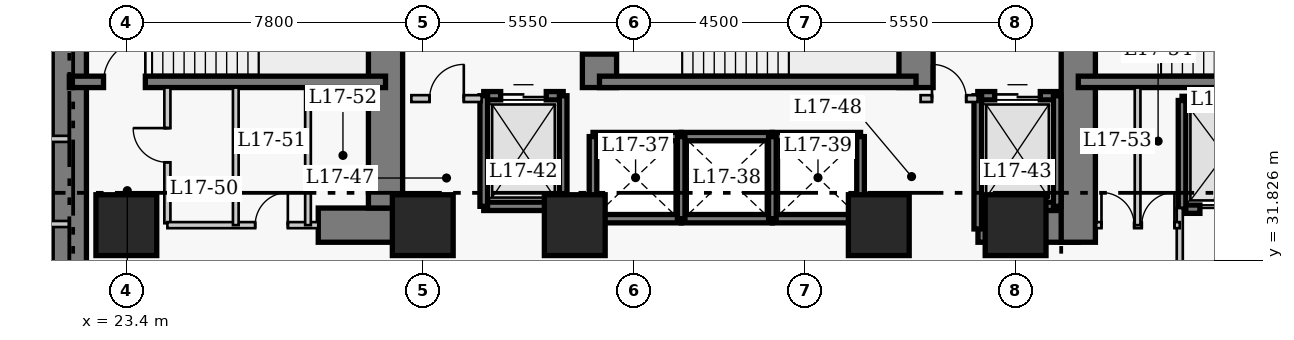
"""IFC4 building model, lengths in metres.
Left out: names, types, materials, properties, quantities, classifications, styles, units other than length and angle.
Written with IfcOpenShell. Run it as: python <this file> out.ifc"""

import sys

from ifc_helpers import new_model, si_unit, direction, frame, frame_2d, origin, origin_2d, place, context, subcontext, project, spatial, rectangle, extrude, element, fill, save


model = new_model("IFC4")
c1 = context("Model", 3, precision=1e-05, world=origin(), true_north=direction((0.0, 1.0)))
c2 = subcontext(c1, "Body", "Model", "MODEL_VIEW")
j1 = project(units=[si_unit("LENGTHUNIT", "METRE"), si_unit("PLANEANGLEUNIT", "RADIAN")], contexts=[c1])
p1 = place(None, origin())
s1 = spatial("IfcSite", under=j1, at=p1, CompositionType="ELEMENT")
p2 = place(p1, origin())
s2 = spatial("IfcBuilding", under=s1, at=p2, CompositionType="ELEMENT")
p3 = place(p2, frame((0.0, 0.0, 71.6)))
s3 = spatial("IfcBuildingStorey", under=s2, at=p3, CompositionType="ELEMENT", Elevation=71.6)
p4 = place(p3, frame((21.9, 27.05, 0.0), z_axis=(0.0, 0.0, 1.0), x_axis=(0.0, 1.0, 0.0)))
e1 = element("IfcWall", 1, at=p4, inside=s3, PredefinedType="SHEAR", context=c2, shape_type="SweptSolid", body=[
    extrude(rectangle(XDim=13.72, YDim=0.9, at=frame_2d((6.86, 0.0))), origin(), (0.0, 0.0, 1.0), 3.8),
])
p5 = place(p3, frame((28.45, 32.75, 0.0), z_axis=(0.0, 0.0, 1.0), x_axis=(1.0, 0.0, 0.0)))
e2 = element("IfcWall", 2, at=p5, inside=s3, PredefinedType="SHEAR", context=c2, shape_type="SweptSolid", body=[
    extrude(rectangle(XDim=2.4, YDim=0.9, at=frame_2d((1.2, 0.0))), origin(), (0.0, 0.0, 1.0), 3.8),
])
p6 = place(p3, frame((45.81, 32.75, 0.0), z_axis=(0.0, 0.0, 1.0), x_axis=(1.0, 0.0, 0.0)))
e3 = element("IfcWall", 3, at=p6, inside=s3, PredefinedType="SHEAR", context=c2, shape_type="SweptSolid", body=[
    extrude(rectangle(XDim=2.64, YDim=0.9, at=frame_2d((1.32, 0.0))), origin(), (0.0, 0.0, 1.0), 3.8),
])
p7 = place(p3, frame((30.22, 33.2, 0.0), z_axis=(0.0, 0.0, 1.0), x_axis=(0.0, 1.0, 0.0)))
e4 = element("IfcWall", 4, at=p7, inside=s3, PredefinedType="SHEAR", context=c2, shape_type="SweptSolid", body=[
    extrude(rectangle(XDim=7.12, YDim=0.9, at=frame_2d((3.56, 0.0))), origin(), (0.0, 0.0, 1.0), 3.8),
])
p8 = place(p3, frame((35.85, 36.37, 0.0), z_axis=(0.0, 0.0, 1.0), x_axis=(0.0, 1.0, 0.0)))
e5 = element("IfcWall", 5, at=p8, inside=s3, PredefinedType="SHEAR", context=c2, shape_type="SweptSolid", body=[
    extrude(rectangle(XDim=3.95, YDim=0.9, at=frame_2d((1.975, 0.0))), origin(), (0.0, 0.0, 1.0), 3.8),
])
p9 = place(p8, frame((0.88, 0.0, 0.0)))
e6 = element("IfcOpeningElement", 6, at=p9, cuts=e5, PredefinedType="OPENING", context=c2, shape_type="SweptSolid", body=[
    extrude(rectangle(XDim=1.1, YDim=2.15, at=frame_2d((0.55, 1.075))), frame((0.0, 0.46, 0.0), z_axis=(0.0, -1.0, 0.0), x_axis=(1.0, 0.0, 0.0)), (0.0, 0.0, 1.0), 0.92),
])
p10 = place(p3, frame((44.18, 36.37, 0.0), z_axis=(0.0, 0.0, 1.0), x_axis=(0.0, 1.0, 0.0)))
e7 = element("IfcWall", 7, at=p10, inside=s3, PredefinedType="SHEAR", context=c2, shape_type="SweptSolid", body=[
    extrude(rectangle(XDim=3.95, YDim=0.9, at=frame_2d((1.975, 0.0))), origin(), (0.0, 0.0, 1.0), 3.8),
])
p11 = place(p3, frame((48.45, 32.3, 0.0), z_axis=(0.0, 0.0, 1.0), x_axis=(0.0, 1.0, 0.0)))
e8 = element("IfcWall", 8, at=p11, inside=s3, PredefinedType="SHEAR", context=c2, shape_type="SweptSolid", body=[
    extrude(rectangle(XDim=8.02, YDim=0.9, at=frame_2d((4.01, 0.0))), origin(), (0.0, 0.0, 1.0), 3.8),
])
p12 = place(p11, frame((5.9, 0.0, 0.0)))
e9 = element("IfcOpeningElement", 9, at=p12, cuts=e8, PredefinedType="OPENING", context=c2, shape_type="SweptSolid", body=[
    extrude(rectangle(XDim=1.1, YDim=2.15, at=frame_2d((0.55, 1.075))), frame((0.0, 0.46, 0.0), z_axis=(0.0, -1.0, 0.0), x_axis=(1.0, 0.0, 0.0)), (0.0, 0.0, 1.0), 0.92),
])
p13 = place(p3, frame((21.9, 36.52, 0.0), z_axis=(0.0, 0.0, 1.0), x_axis=(1.0, 0.0, 0.0)))
e10 = element("IfcWall", 10, at=p13, inside=s3, PredefinedType="SHEAR", context=c2, shape_type="SweptSolid", body=[
    extrude(rectangle(XDim=8.32, YDim=0.3, at=frame_2d((4.16, 0.0))), origin(), (0.0, 0.0, 1.0), 3.8),
])
p14 = place(p13, frame((0.9, 0.0, 0.0)))
e11 = element("IfcOpeningElement", 11, at=p14, cuts=e10, PredefinedType="OPENING", context=c2, shape_type="SweptSolid", body=[
    extrude(rectangle(XDim=1.1, YDim=2.15, at=frame_2d((0.55, 1.075))), frame((0.0, 0.16, 0.0), z_axis=(0.0, -1.0, 0.0), x_axis=(1.0, 0.0, 0.0)), (0.0, 0.0, 1.0), 0.32),
])
p15 = place(p3, frame((35.85, 36.52, 0.0), z_axis=(0.0, 0.0, 1.0), x_axis=(1.0, 0.0, 0.0)))
e12 = element("IfcWall", 12, at=p15, inside=s3, PredefinedType="SHEAR", context=c2, shape_type="SweptSolid", body=[
    extrude(rectangle(XDim=8.33, YDim=0.3, at=frame_2d((4.165, 0.0))), origin(), (0.0, 0.0, 1.0), 3.8),
])
p16 = place(p3, frame((48.45, 36.52, 0.0), z_axis=(0.0, 0.0, 1.0), x_axis=(1.0, 0.0, 0.0)))
e13 = element("IfcWall", 13, at=p16, inside=s3, PredefinedType="SHEAR", context=c2, shape_type="SweptSolid", body=[
    extrude(rectangle(XDim=8.52, YDim=0.3, at=frame_2d((4.26, 0.0))), origin(), (0.0, 0.0, 1.0), 3.8),
])
for number, where, z_axis, x_axis in (
    (14, (23.4, 32.75, 0.0), (0.0, 0.0, 1.0), (1.0, 0.0, 0.0)),
    (15, (31.2, 32.75, 0.0), (0.0, 0.0, 1.0), (1.0, 0.0, 0.0)),
    (16, (35.2, 32.75, 0.0), (0.0, 0.0, 1.0), (1.0, 0.0, 0.0)),
    (17, (43.2, 32.75, 0.0), (0.0, 0.0, 1.0), (1.0, 0.0, 0.0)),
    (18, (46.8, 32.75, 0.0), (0.0, 0.0, 1.0), (1.0, 0.0, 0.0)),
):
    element("IfcColumn", number, at=place(p3, frame(where, z_axis=z_axis, x_axis=x_axis)), inside=s3, PredefinedType="COLUMN", context=c2, shape_type="SweptSolid", body=[
        extrude(rectangle(XDim=1.6, YDim=1.6, at=origin_2d()), origin(), (0.0, 0.0, 1.0), 3.8),
    ])
for number, where, z_axis, x_axis in (
    (19, (35.68, 35.08, 0.0), (0.0, 0.0, 1.0), (1.0, 0.0, 0.0)),
    (20, (35.68, 32.92, 0.0), (0.0, 0.0, 1.0), (1.0, 0.0, 0.0)),
):
    element("IfcWall", number, at=place(p3, frame(where, z_axis=z_axis, x_axis=x_axis)), inside=s3, PredefinedType="SHEAR", context=c2, shape_type="SweptSolid", body=[
        extrude(rectangle(XDim=2.32, YDim=0.22, at=frame_2d((1.16, 0.0))), origin(), (0.0, 0.0, 1.0), 3.8),
    ])
p17 = place(p3, frame((35.68, 32.92, 0.0), z_axis=(0.0, 0.0, 1.0), x_axis=(0.0, 1.0, 0.0)))
e21 = element("IfcWall", 21, at=p17, inside=s3, PredefinedType="SHEAR", context=c2, shape_type="SweptSolid", body=[
    extrude(rectangle(XDim=2.16, YDim=0.2, at=frame_2d((1.08, 0.0))), origin(), (0.0, 0.0, 1.0), 3.8),
])
for number, where, z_axis, x_axis in (
    (22, (38.0, 35.08, 0.0), (0.0, 0.0, 1.0), (1.0, 0.0, 0.0)),
    (23, (38.0, 32.92, 0.0), (0.0, 0.0, 1.0), (1.0, 0.0, 0.0)),
):
    element("IfcWall", number, at=place(p3, frame(where, z_axis=z_axis, x_axis=x_axis)), inside=s3, PredefinedType="SHEAR", context=c2, shape_type="SweptSolid", body=[
        extrude(rectangle(XDim=2.4, YDim=0.22, at=frame_2d((1.2, 0.0))), origin(), (0.0, 0.0, 1.0), 3.8),
    ])
p18 = place(p3, frame((38.0, 32.92, 0.0), z_axis=(0.0, 0.0, 1.0), x_axis=(0.0, 1.0, 0.0)))
e24 = element("IfcWall", 24, at=p18, inside=s3, PredefinedType="SHEAR", context=c2, shape_type="SweptSolid", body=[
    extrude(rectangle(XDim=2.16, YDim=0.2, at=frame_2d((1.08, 0.0))), origin(), (0.0, 0.0, 1.0), 3.8),
])
for number, where, z_axis, x_axis in (
    (25, (40.4, 35.08, 0.0), (0.0, 0.0, 1.0), (1.0, 0.0, 0.0)),
    (26, (40.4, 32.92, 0.0), (0.0, 0.0, 1.0), (1.0, 0.0, 0.0)),
):
    element("IfcWall", number, at=place(p3, frame(where, z_axis=z_axis, x_axis=x_axis)), inside=s3, PredefinedType="SHEAR", context=c2, shape_type="SweptSolid", body=[
        extrude(rectangle(XDim=2.32, YDim=0.22, at=frame_2d((1.16, 0.0))), origin(), (0.0, 0.0, 1.0), 3.8),
    ])
for number, where, z_axis, x_axis in (
    (27, (40.4, 32.92, 0.0), (0.0, 0.0, 1.0), (0.0, 1.0, 0.0)),
    (28, (42.72, 32.92, 0.0), (0.0, 0.0, 1.0), (0.0, 1.0, 0.0)),
):
    element("IfcWall", number, at=place(p3, frame(where, z_axis=z_axis, x_axis=x_axis)), inside=s3, PredefinedType="SHEAR", context=c2, shape_type="SweptSolid", body=[
        extrude(rectangle(XDim=2.16, YDim=0.2, at=frame_2d((1.08, 0.0))), origin(), (0.0, 0.0, 1.0), 3.8),
    ])
p19 = place(p3, frame((51.18, 36.03, 0.0), z_axis=(0.0, 0.0, 1.0), x_axis=(1.0, 0.0, 0.0)))
e29 = element("IfcWall", 29, at=p19, inside=s3, PredefinedType="SHEAR", context=c2, shape_type="SweptSolid", body=[
    extrude(rectangle(XDim=2.42, YDim=0.22, at=frame_2d((1.21, 0.0))), origin(), (0.0, 0.0, 1.0), 3.8),
])
p20 = place(p3, frame((51.18, 33.17, 0.0), z_axis=(0.0, 0.0, 1.0), x_axis=(1.0, 0.0, 0.0)))
e30 = element("IfcWall", 30, at=p20, inside=s3, PredefinedType="SHEAR", context=c2, shape_type="SweptSolid", body=[
    extrude(rectangle(XDim=2.42, YDim=0.22, at=frame_2d((1.21, 0.0))), origin(), (0.0, 0.0, 1.0), 3.8),
])
p21 = place(p20, frame((0.47, 0.0, 0.0)))
e31 = element("IfcOpeningElement", 31, at=p21, cuts=e30, PredefinedType="OPENING", context=c2, shape_type="SweptSolid", body=[
    extrude(rectangle(XDim=1.3, YDim=2.15, at=frame_2d((0.65, 1.075))), frame((0.0, 0.12, 0.0), z_axis=(0.0, -1.0, 0.0), x_axis=(1.0, 0.0, 0.0)), (0.0, 0.0, 1.0), 0.24),
])
p22 = place(p3, frame((51.18, 33.17, 0.0), z_axis=(0.0, 0.0, 1.0), x_axis=(0.0, 1.0, 0.0)))
e32 = element("IfcWall", 32, at=p22, inside=s3, PredefinedType="SHEAR", context=c2, shape_type="SweptSolid", body=[
    extrude(rectangle(XDim=2.86, YDim=0.2, at=frame_2d((1.43, 0.0))), origin(), (0.0, 0.0, 1.0), 3.8),
])
p23 = place(p3, frame((32.805, 36.155, 0.0), z_axis=(0.0, 0.0, 1.0), x_axis=(1.0, 0.0, 0.0)))
e33 = element("IfcWall", 33, at=p23, inside=s3, PredefinedType="SHEAR", context=c2, shape_type="SweptSolid", body=[
    extrude(rectangle(XDim=2.09, YDim=0.22, at=frame_2d((1.045, 0.0))), origin(), (0.0, 0.0, 1.0), 3.8),
])
p24 = place(p23, frame((0.445, 0.0, 0.0)))
e34 = element("IfcOpeningElement", 34, at=p24, cuts=e33, PredefinedType="OPENING", context=c2, shape_type="SweptSolid", body=[
    extrude(rectangle(XDim=1.2, YDim=2.15, at=frame_2d((0.6, 1.075))), frame((0.0, 0.12, 0.0), z_axis=(0.0, -1.0, 0.0), x_axis=(1.0, 0.0, 0.0)), (0.0, 0.0, 1.0), 0.24),
])
p25 = place(p3, frame((32.805, 33.245, 0.0), z_axis=(0.0, 0.0, 1.0), x_axis=(1.0, 0.0, 0.0)))
e35 = element("IfcWall", 35, at=p25, inside=s3, PredefinedType="SHEAR", context=c2, shape_type="SweptSolid", body=[
    extrude(rectangle(XDim=2.09, YDim=0.22, at=frame_2d((1.045, 0.0))), origin(), (0.0, 0.0, 1.0), 3.8),
])
for number, where, z_axis, x_axis in (
    (36, (32.805, 33.245, 0.0), (0.0, 0.0, 1.0), (0.0, 1.0, 0.0)),
    (37, (34.895, 33.245, 0.0), (0.0, 0.0, 1.0), (0.0, 1.0, 0.0)),
):
    element("IfcWall", number, at=place(p3, frame(where, z_axis=z_axis, x_axis=x_axis)), inside=s3, PredefinedType="SHEAR", context=c2, shape_type="SweptSolid", body=[
        extrude(rectangle(XDim=2.91, YDim=0.2, at=frame_2d((1.455, 0.0))), origin(), (0.0, 0.0, 1.0), 3.8),
    ])
p26 = place(p3, frame((45.805, 36.155, 0.0), z_axis=(0.0, 0.0, 1.0), x_axis=(1.0, 0.0, 0.0)))
e38 = element("IfcWall", 38, at=p26, inside=s3, PredefinedType="SHEAR", context=c2, shape_type="SweptSolid", body=[
    extrude(rectangle(XDim=2.09, YDim=0.22, at=frame_2d((1.045, 0.0))), origin(), (0.0, 0.0, 1.0), 3.8),
])
p27 = place(p26, frame((0.445, 0.0, 0.0)))
e39 = element("IfcOpeningElement", 39, at=p27, cuts=e38, PredefinedType="OPENING", context=c2, shape_type="SweptSolid", body=[
    extrude(rectangle(XDim=1.2, YDim=2.15, at=frame_2d((0.6, 1.075))), frame((0.0, 0.12, 0.0), z_axis=(0.0, -1.0, 0.0), x_axis=(1.0, 0.0, 0.0)), (0.0, 0.0, 1.0), 0.24),
])
p28 = place(p3, frame((45.805, 33.245, 0.0), z_axis=(0.0, 0.0, 1.0), x_axis=(1.0, 0.0, 0.0)))
e40 = element("IfcWall", 40, at=p28, inside=s3, PredefinedType="SHEAR", context=c2, shape_type="SweptSolid", body=[
    extrude(rectangle(XDim=2.09, YDim=0.22, at=frame_2d((1.045, 0.0))), origin(), (0.0, 0.0, 1.0), 3.8),
])
p29 = place(p3, frame((45.805, 32.65, 0.0), z_axis=(0.0, 0.0, 1.0), x_axis=(0.0, 1.0, 0.0)))
e41 = element("IfcWall", 41, at=p29, inside=s3, PredefinedType="SHEAR", context=c2, shape_type="SweptSolid", body=[
    extrude(rectangle(XDim=3.505, YDim=0.2, at=frame_2d((1.752, 0.0))), origin(), (0.0, 0.0, 1.0), 3.8),
])
p30 = place(p3, frame((47.895, 33.245, 0.0), z_axis=(0.0, 0.0, 1.0), x_axis=(0.0, 1.0, 0.0)))
e42 = element("IfcWall", 42, at=p30, inside=s3, PredefinedType="SHEAR", context=c2, shape_type="SweptSolid", body=[
    extrude(rectangle(XDim=2.91, YDim=0.2, at=frame_2d((1.455, 0.0))), origin(), (0.0, 0.0, 1.0), 3.8),
])
p31 = place(p3, frame((30.9, 36.08, 0.0), z_axis=(0.0, 0.0, 1.0), x_axis=(1.0, 0.0, 0.0)))
e43 = element("IfcWall", 43, at=p31, inside=s3, PredefinedType="PARTITIONING", context=c2, shape_type="SweptSolid", body=[
    extrude(rectangle(XDim=1.85, YDim=0.18, at=frame_2d((0.925, 0.0))), origin(), (0.0, 0.0, 1.0), 3.42),
])
p32 = place(p31, frame((0.48, 0.0, 0.0)))
e44 = element("IfcOpeningElement", 44, at=p32, cuts=e43, PredefinedType="OPENING", context=c2, shape_type="SweptSolid", body=[
    extrude(rectangle(XDim=0.9, YDim=2.15, at=frame_2d((0.45, 1.075))), frame((0.0, 0.1, 0.0), z_axis=(0.0, -1.0, 0.0), x_axis=(1.0, 0.0, 0.0)), (0.0, 0.0, 1.0), 0.2),
])
p33 = place(p3, frame((44.3, 36.08, 0.0), z_axis=(0.0, 0.0, 1.0), x_axis=(1.0, 0.0, 0.0)))
e45 = element("IfcWall", 45, at=p33, inside=s3, PredefinedType="PARTITIONING", context=c2, shape_type="SweptSolid", body=[
    extrude(rectangle(XDim=1.5, YDim=0.18, at=frame_2d((0.75, 0.0))), origin(), (0.0, 0.0, 1.0), 3.42),
])
p34 = place(p33, frame((0.3, 0.0, 0.0)))
e46 = element("IfcOpeningElement", 46, at=p34, cuts=e45, PredefinedType="OPENING", context=c2, shape_type="SweptSolid", body=[
    extrude(rectangle(XDim=0.9, YDim=2.15, at=frame_2d((0.45, 1.075))), frame((0.0, 0.1, 0.0), z_axis=(0.0, -1.0, 0.0), x_axis=(1.0, 0.0, 0.0)), (0.0, 0.0, 1.0), 0.2),
])
p35 = place(p3, frame((24.48, 32.8, 0.0), z_axis=(0.0, 0.0, 1.0), x_axis=(0.0, 1.0, 0.0)))
e47 = element("IfcWall", 47, at=p35, inside=s3, PredefinedType="PARTITIONING", context=c2, shape_type="SweptSolid", body=[
    extrude(rectangle(XDim=3.57, YDim=0.16, at=frame_2d((1.785, 0.0))), origin(), (0.0, 0.0, 1.0), 3.42),
])
p36 = place(p35, frame((1.604, 0.0, 0.0)))
e48 = element("IfcOpeningElement", 48, at=p36, cuts=e47, PredefinedType="OPENING", context=c2, shape_type="SweptSolid", body=[
    extrude(rectangle(XDim=0.9, YDim=2.1, at=frame_2d((0.45, 1.05))), frame((0.0, 0.09, 0.0), z_axis=(0.0, -1.0, 0.0), x_axis=(1.0, 0.0, 0.0)), (0.0, 0.0, 1.0), 0.18),
])
p37 = place(p3, frame((51.12, 29.5, 0.0), z_axis=(0.0, 0.0, 1.0), x_axis=(0.0, 1.0, 0.0)))
e49 = element("IfcWall", 49, at=p37, inside=s3, PredefinedType="PARTITIONING", context=c2, shape_type="SweptSolid", body=[
    extrude(rectangle(XDim=3.7, YDim=0.16, at=frame_2d((1.85, 0.0))), origin(), (0.0, 0.0, 1.0), 3.42),
])
p38 = place(p37, frame((0.9, 0.0, 0.0)))
e50 = element("IfcOpeningElement", 50, at=p38, cuts=e49, PredefinedType="OPENING", context=c2, shape_type="SweptSolid", body=[
    extrude(rectangle(XDim=1.1, YDim=2.15, at=frame_2d((0.55, 1.075))), frame((0.0, 0.09, 0.0), z_axis=(0.0, -1.0, 0.0), x_axis=(1.0, 0.0, 0.0)), (0.0, 0.0, 1.0), 0.18),
])
p39 = place(p3, frame((24.48, 32.75, 0.0), z_axis=(0.0, 0.0, 1.0), x_axis=(1.0, 0.0, 0.0)))
e51 = element("IfcWall", 51, at=p39, inside=s3, PredefinedType="PARTITIONING", context=c2, shape_type="SweptSolid", body=[
    extrude(rectangle(XDim=3.97, YDim=0.16, at=frame_2d((1.985, 0.0))), origin(), (0.0, 0.0, 1.0), 3.42),
])
p40 = place(p39, frame((2.31, 0.0, 0.0)))
e52 = element("IfcOpeningElement", 52, at=p40, cuts=e51, PredefinedType="OPENING", context=c2, shape_type="SweptSolid", body=[
    extrude(rectangle(XDim=0.86, YDim=2.05, at=frame_2d((0.43, 1.025))), frame((0.0, 0.09, 0.0), z_axis=(0.0, -1.0, 0.0), x_axis=(1.0, 0.0, 0.0)), (0.0, 0.0, 1.0), 0.18),
])
p41 = place(p3, frame((48.92, 32.75, 0.0), z_axis=(0.0, 0.0, 1.0), x_axis=(1.0, 0.0, 0.0)))
e53 = element("IfcWall", 53, at=p41, inside=s3, PredefinedType="PARTITIONING", context=c2, shape_type="SweptSolid", body=[
    extrude(rectangle(XDim=2.2, YDim=0.16, at=frame_2d((1.1, 0.0))), origin(), (0.0, 0.0, 1.0), 3.42),
])
p42 = place(p41, frame((0.14, 0.0, 0.0)))
e54 = element("IfcOpeningElement", 54, at=p42, cuts=e53, PredefinedType="OPENING", context=c2, shape_type="SweptSolid", body=[
    extrude(rectangle(XDim=0.86, YDim=2.05, at=frame_2d((0.43, 1.025))), frame((0.0, 0.09, 0.0), z_axis=(0.0, -1.0, 0.0), x_axis=(1.0, 0.0, 0.0)), (0.0, 0.0, 1.0), 0.18),
])
p43 = place(p41, frame((1.2, 0.0, 0.0)))
e55 = element("IfcOpeningElement", 55, at=p43, cuts=e53, PredefinedType="OPENING", context=c2, shape_type="SweptSolid", body=[
    extrude(rectangle(XDim=0.86, YDim=2.05, at=frame_2d((0.43, 1.025))), frame((0.0, 0.09, 0.0), z_axis=(0.0, -1.0, 0.0), x_axis=(1.0, 0.0, 0.0)), (0.0, 0.0, 1.0), 0.18),
])
for number, where, z_axis, x_axis in (
    (56, (26.28, 32.75, 0.0), (0.0, 0.0, 1.0), (0.0, 1.0, 0.0)),
    (57, (28.18, 32.75, 0.0), (0.0, 0.0, 1.0), (0.0, 1.0, 0.0)),
    (58, (50.01, 32.75, 0.0), (0.0, 0.0, 1.0), (0.0, 1.0, 0.0)),
):
    element("IfcWall", number, at=place(p3, frame(where, z_axis=z_axis, x_axis=x_axis)), inside=s3, PredefinedType="PARTITIONING", context=c2, shape_type="SweptSolid", body=[
        extrude(rectangle(XDim=3.62, YDim=0.15, at=frame_2d((1.81, 0.0))), origin(), (0.0, 0.0, 1.0), 3.42),
    ])
for number, where, z_axis, x_axis in (
    (59, (19.16, 35.02, 0.0), (0.0, 0.0, 1.0), (1.0, 0.0, 0.0)),
    (60, (19.16, 32.78, 0.0), (0.0, 0.0, 1.0), (1.0, 0.0, 0.0)),
):
    element("IfcWall", number, at=place(p3, frame(where, z_axis=z_axis, x_axis=x_axis)), inside=s3, PredefinedType="PARTITIONING", context=c2, shape_type="SweptSolid", body=[
        extrude(rectangle(XDim=2.74, YDim=0.16, at=frame_2d((1.37, 0.0))), origin(), (0.0, 0.0, 1.0), 3.42),
    ])
p44 = place(p21, origin())
e61 = element("IfcDoor", 61, at=p44, inside=s3, OperationType="DOUBLE_DOOR_SLIDING", PredefinedType="DOOR", context=c2, shape_type="SweptSolid", body=[
    extrude(rectangle(XDim=1.3, YDim=2.15, at=frame_2d((0.65, 1.075))), frame((0.0, 0.025, 0.0), z_axis=(0.0, -1.0, 0.0), x_axis=(1.0, 0.0, 0.0)), (0.0, 0.0, 1.0), 0.05),
])
fill(e31, e61)
p45 = place(p24, origin())
e62 = element("IfcDoor", 62, at=p45, inside=s3, OperationType="DOUBLE_DOOR_SLIDING", PredefinedType="DOOR", context=c2, shape_type="SweptSolid", body=[
    extrude(rectangle(XDim=1.2, YDim=2.15, at=frame_2d((0.6, 1.075))), frame((0.0, 0.025, 0.0), z_axis=(0.0, -1.0, 0.0), x_axis=(1.0, 0.0, 0.0)), (0.0, 0.0, 1.0), 0.05),
])
fill(e34, e62)
p46 = place(p27, origin())
e63 = element("IfcDoor", 63, at=p46, inside=s3, OperationType="DOUBLE_DOOR_SLIDING", PredefinedType="DOOR", context=c2, shape_type="SweptSolid", body=[
    extrude(rectangle(XDim=1.2, YDim=2.15, at=frame_2d((0.6, 1.075))), frame((0.0, 0.025, 0.0), z_axis=(0.0, -1.0, 0.0), x_axis=(1.0, 0.0, 0.0)), (0.0, 0.0, 1.0), 0.05),
])
fill(e39, e63)
p47 = place(p32, origin())
e64 = element("IfcDoor", 64, at=p47, inside=s3, OperationType="SINGLE_SWING_RIGHT", PredefinedType="DOOR", context=c2, shape_type="SweptSolid", body=[
    extrude(rectangle(XDim=0.9, YDim=2.15, at=frame_2d((0.45, 1.075))), frame((0.0, 0.025, 0.0), z_axis=(0.0, -1.0, 0.0), x_axis=(1.0, 0.0, 0.0)), (0.0, 0.0, 1.0), 0.05),
])
fill(e44, e64)
p48 = place(p34, origin())
e65 = element("IfcDoor", 65, at=p48, inside=s3, OperationType="SINGLE_SWING_LEFT", PredefinedType="DOOR", context=c2, shape_type="SweptSolid", body=[
    extrude(rectangle(XDim=0.9, YDim=2.15, at=frame_2d((0.45, 1.075))), frame((0.0, 0.025, 0.0), z_axis=(0.0, -1.0, 0.0), x_axis=(1.0, 0.0, 0.0)), (0.0, 0.0, 1.0), 0.05),
])
fill(e46, e65)
p49 = place(p36, origin())
e66 = element("IfcDoor", 66, at=p49, inside=s3, OperationType="SINGLE_SWING_RIGHT", PredefinedType="DOOR", context=c2, shape_type="SweptSolid", body=[
    extrude(rectangle(XDim=0.9, YDim=2.1, at=frame_2d((0.45, 1.05))), frame((0.0, 0.025, 0.0), z_axis=(0.0, -1.0, 0.0), x_axis=(1.0, 0.0, 0.0)), (0.0, 0.0, 1.0), 0.05),
])
fill(e48, e66)
p50 = place(p40, origin())
e67 = element("IfcDoor", 67, at=p50, inside=s3, OperationType="SINGLE_SWING_RIGHT", PredefinedType="DOOR", context=c2, shape_type="SweptSolid", body=[
    extrude(rectangle(XDim=0.86, YDim=2.05, at=frame_2d((0.43, 1.025))), frame((0.0, 0.025, 0.0), z_axis=(0.0, -1.0, 0.0), x_axis=(1.0, 0.0, 0.0)), (0.0, 0.0, 1.0), 0.05),
])
fill(e52, e67)
p51 = place(p42, origin())
e68 = element("IfcDoor", 68, at=p51, inside=s3, OperationType="SINGLE_SWING_LEFT", PredefinedType="DOOR", context=c2, shape_type="SweptSolid", body=[
    extrude(rectangle(XDim=0.86, YDim=2.05, at=frame_2d((0.43, 1.025))), frame((0.0, 0.025, 0.0), z_axis=(0.0, -1.0, 0.0), x_axis=(1.0, 0.0, 0.0)), (0.0, 0.0, 1.0), 0.05),
])
fill(e54, e68)
p52 = place(p43, origin())
e69 = element("IfcDoor", 69, at=p52, inside=s3, OperationType="SINGLE_SWING_RIGHT", PredefinedType="DOOR", context=c2, shape_type="SweptSolid", body=[
    extrude(rectangle(XDim=0.86, YDim=2.05, at=frame_2d((0.43, 1.025))), frame((0.0, 0.025, 0.0), z_axis=(0.0, -1.0, 0.0), x_axis=(1.0, 0.0, 0.0)), (0.0, 0.0, 1.0), 0.05),
])
fill(e55, e69)
p53 = place(p14, origin())
e70 = element("IfcDoor", 70, at=p53, inside=s3, OperationType="SINGLE_SWING_RIGHT", PredefinedType="DOOR", context=c2, shape_type="SweptSolid", body=[
    extrude(rectangle(XDim=1.1, YDim=2.15, at=frame_2d((0.55, 1.075))), frame((0.0, 0.025, 0.0), z_axis=(0.0, -1.0, 0.0), x_axis=(1.0, 0.0, 0.0)), (0.0, 0.0, 1.0), 0.05),
])
fill(e11, e70)
p54 = place(p9, origin())
e71 = element("IfcDoor", 71, at=p54, inside=s3, OperationType="SINGLE_SWING_RIGHT", PredefinedType="DOOR", context=c2, shape_type="SweptSolid", body=[
    extrude(rectangle(XDim=1.1, YDim=2.15, at=frame_2d((0.55, 1.075))), frame((0.0, 0.025, 0.0), z_axis=(0.0, -1.0, 0.0), x_axis=(1.0, 0.0, 0.0)), (0.0, 0.0, 1.0), 0.05),
])
fill(e6, e71)
save(model, sys.argv[1])
